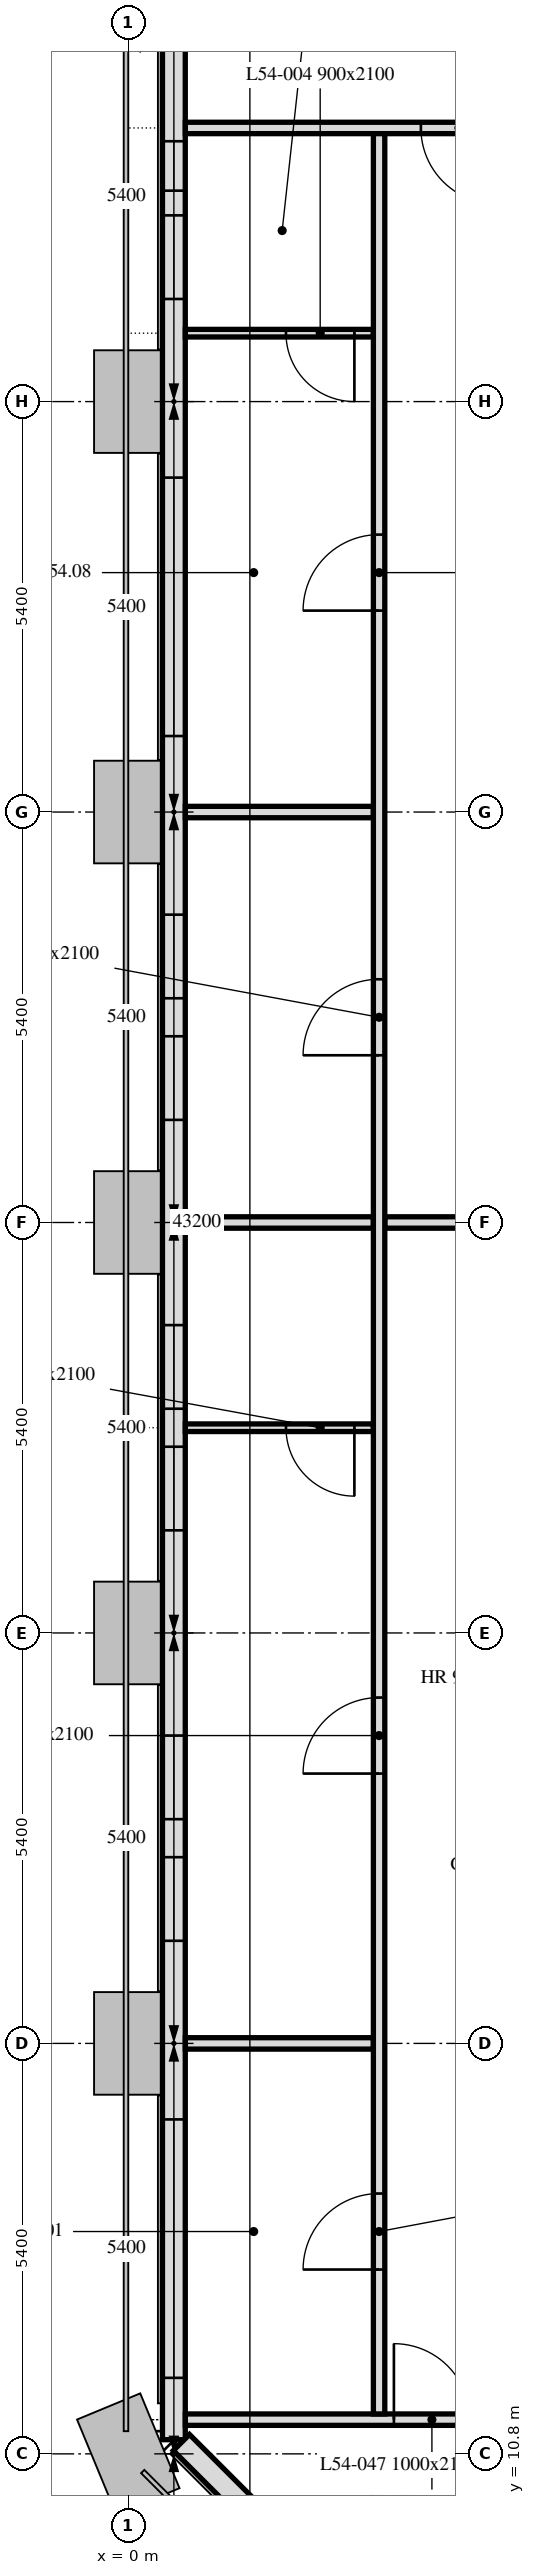
"""IFC4 building model, lengths in metres.
Left out: names, types, materials, properties, quantities, classifications, styles, units other than length and angle.
Written with IfcOpenShell. Run it as: python <this file> out.ifc"""

import sys

from ifc_helpers import new_model, si_unit, direction, frame, frame_2d, origin, place, context, subcontext, project, spatial, rectangle, extrude, element, fill, save


model = new_model("IFC4")
c1 = context("Model", 3, precision=1e-05, world=origin(), true_north=direction((0.0, 1.0)))
c2 = subcontext(c1, "Body", "Model", "MODEL_VIEW")
j1 = project(units=[si_unit("LENGTHUNIT", "METRE"), si_unit("PLANEANGLEUNIT", "RADIAN")], contexts=[c1])
p1 = place(None, origin())
s1 = spatial("IfcSite", under=j1, at=p1, CompositionType="ELEMENT")
p2 = place(p1, origin())
s2 = spatial("IfcBuilding", under=s1, at=p2, CompositionType="ELEMENT")
p3 = place(p2, frame((0.0, 0.0, 217.0)))
s3 = spatial("IfcBuildingStorey", under=s2, at=p3, CompositionType="ELEMENT", Elevation=217.0)
p4 = place(p3, frame((0.6, 43.014, 0.0), z_axis=(0.0, 0.0, 1.0), x_axis=(0.0, -1.0, 0.0)))
e1 = element("IfcWall", 1, at=p4, inside=s3, PredefinedType="SOLIDWALL", context=c2, shape_type="SweptSolid", body=[
    extrude(rectangle(XDim=32.027, YDim=0.3, at=frame_2d((16.014, 0.0))), origin(), (0.0, 0.0, 1.0), 3.0),
])
p5 = place(p4, frame((1.789, 0.0, 0.9)))
e2 = element("IfcOpeningElement", 2, at=p5, cuts=e1, PredefinedType="OPENING", context=c2, shape_type="SweptSolid", body=[
    extrude(rectangle(XDim=0.65, YDim=1.7, at=frame_2d((0.325, 0.85))), frame((0.0, 0.16, 0.0), z_axis=(0.0, -1.0, 0.0), x_axis=(1.0, 0.0, 0.0)), (0.0, 0.0, 1.0), 0.32),
])
p6 = place(p4, frame((2.764, 0.0, 0.9)))
e3 = element("IfcOpeningElement", 3, at=p6, cuts=e1, PredefinedType="OPENING", context=c2, shape_type="SweptSolid", body=[
    extrude(rectangle(XDim=1.1, YDim=1.7, at=frame_2d((0.55, 0.85))), frame((0.0, 0.16, 0.0), z_axis=(0.0, -1.0, 0.0), x_axis=(1.0, 0.0, 0.0)), (0.0, 0.0, 1.0), 0.32),
])
p7 = place(p4, frame((6.214, 0.0, 0.9)))
e4 = element("IfcOpeningElement", 4, at=p7, cuts=e1, PredefinedType="OPENING", context=c2, shape_type="SweptSolid", body=[
    extrude(rectangle(XDim=3.4, YDim=1.7, at=frame_2d((1.7, 0.85))), frame((0.0, 0.16, 0.0), z_axis=(0.0, -1.0, 0.0), x_axis=(1.0, 0.0, 0.0)), (0.0, 0.0, 1.0), 0.32),
])
p8 = place(p4, frame((11.964, 0.0, 0.9)))
e5 = element("IfcOpeningElement", 5, at=p8, cuts=e1, PredefinedType="OPENING", context=c2, shape_type="SweptSolid", body=[
    extrude(rectangle(XDim=1.1, YDim=1.7, at=frame_2d((0.55, 0.85))), frame((0.0, 0.16, 0.0), z_axis=(0.0, -1.0, 0.0), x_axis=(1.0, 0.0, 0.0)), (0.0, 0.0, 1.0), 0.32),
])
p9 = place(p4, frame((13.564, 0.0, 0.9)))
e6 = element("IfcOpeningElement", 6, at=p9, cuts=e1, PredefinedType="OPENING", context=c2, shape_type="SweptSolid", body=[
    extrude(rectangle(XDim=1.1, YDim=1.7, at=frame_2d((0.55, 0.85))), frame((0.0, 0.16, 0.0), z_axis=(0.0, -1.0, 0.0), x_axis=(1.0, 0.0, 0.0)), (0.0, 0.0, 1.0), 0.32),
])
p10 = place(p4, frame((17.364, 0.0, 0.9)))
e7 = element("IfcOpeningElement", 7, at=p10, cuts=e1, PredefinedType="OPENING", context=c2, shape_type="SweptSolid", body=[
    extrude(rectangle(XDim=1.1, YDim=1.7, at=frame_2d((0.55, 0.85))), frame((0.0, 0.16, 0.0), z_axis=(0.0, -1.0, 0.0), x_axis=(1.0, 0.0, 0.0)), (0.0, 0.0, 1.0), 0.32),
])
p11 = place(p4, frame((18.964, 0.0, 0.9)))
e8 = element("IfcOpeningElement", 8, at=p11, cuts=e1, PredefinedType="OPENING", context=c2, shape_type="SweptSolid", body=[
    extrude(rectangle(XDim=1.1, YDim=1.7, at=frame_2d((0.55, 0.85))), frame((0.0, 0.16, 0.0), z_axis=(0.0, -1.0, 0.0), x_axis=(1.0, 0.0, 0.0)), (0.0, 0.0, 1.0), 0.32),
])
p12 = place(p4, frame((22.764, 0.0, 0.9)))
e9 = element("IfcOpeningElement", 9, at=p12, cuts=e1, PredefinedType="OPENING", context=c2, shape_type="SweptSolid", body=[
    extrude(rectangle(XDim=1.1, YDim=1.7, at=frame_2d((0.55, 0.85))), frame((0.0, 0.16, 0.0), z_axis=(0.0, -1.0, 0.0), x_axis=(1.0, 0.0, 0.0)), (0.0, 0.0, 1.0), 0.32),
])
p13 = place(p4, frame((24.364, 0.0, 0.9)))
e10 = element("IfcOpeningElement", 10, at=p13, cuts=e1, PredefinedType="OPENING", context=c2, shape_type="SweptSolid", body=[
    extrude(rectangle(XDim=1.1, YDim=1.7, at=frame_2d((0.55, 0.85))), frame((0.0, 0.16, 0.0), z_axis=(0.0, -1.0, 0.0), x_axis=(1.0, 0.0, 0.0)), (0.0, 0.0, 1.0), 0.32),
])
p14 = place(p4, frame((27.814, 0.0, 0.9)))
e11 = element("IfcOpeningElement", 11, at=p14, cuts=e1, PredefinedType="OPENING", context=c2, shape_type="SweptSolid", body=[
    extrude(rectangle(XDim=3.4, YDim=1.7, at=frame_2d((1.7, 0.85))), frame((0.0, 0.16, 0.0), z_axis=(0.0, -1.0, 0.0), x_axis=(1.0, 0.0, 0.0)), (0.0, 0.0, 1.0), 0.32),
])
p15 = place(p3, frame((0.699, 10.949, 0.0), z_axis=(0.0, 0.0, 1.0), x_axis=(0.707106781187, -0.707106781187, 0.0)))
e12 = element("IfcWall", 12, at=p15, inside=s3, PredefinedType="SOLIDWALL", context=c2, shape_type="SweptSolid", body=[
    extrude(rectangle(XDim=6.86, YDim=0.3, at=frame_2d((3.43, 0.0))), origin(), (0.0, 0.0, 1.0), 3.0),
])
p16 = place(p15, frame((1.28, 0.0, 0.9)))
e13 = element("IfcOpeningElement", 13, at=p16, cuts=e12, PredefinedType="OPENING", context=c2, shape_type="SweptSolid", body=[
    extrude(rectangle(XDim=1.1, YDim=1.7, at=frame_2d((0.55, 0.85))), frame((0.0, 0.16, 0.0), z_axis=(0.0, -1.0, 0.0), x_axis=(1.0, 0.0, 0.0)), (0.0, 0.0, 1.0), 0.32),
])
p17 = place(p15, frame((4.48, 0.0, 0.9)))
e14 = element("IfcOpeningElement", 14, at=p17, cuts=e12, PredefinedType="OPENING", context=c2, shape_type="SweptSolid", body=[
    extrude(rectangle(XDim=1.1, YDim=1.7, at=frame_2d((0.55, 0.85))), frame((0.0, 0.16, 0.0), z_axis=(0.0, -1.0, 0.0), x_axis=(1.0, 0.0, 0.0)), (0.0, 0.0, 1.0), 0.32),
])
p18 = place(p3, frame((0.751, 32.4, 0.0), z_axis=(0.0, 0.0, 1.0), x_axis=(1.0, 0.0, 0.0)))
e15 = element("IfcWall", 15, at=p18, inside=s3, PredefinedType="PARTITIONING", context=c2, shape_type="SweptSolid", body=[
    extrude(rectangle(XDim=2.474, YDim=0.15, at=frame_2d((1.237, 0.0))), origin(), (0.0, 0.0, 1.0), 2.4),
])
p19 = place(p3, frame((3.225, 38.7, 0.0), z_axis=(0.0, 0.0, 1.0), x_axis=(-1.0, 0.0, 0.0)))
e16 = element("IfcWall", 16, at=p19, inside=s3, PredefinedType="PARTITIONING", context=c2, shape_type="SweptSolid", body=[
    extrude(rectangle(XDim=2.474, YDim=0.1, at=frame_2d((1.237, 0.0))), origin(), (0.0, 0.0, 1.0), 3.0),
])
p20 = place(p19, frame((0.25, 0.0, 0.0)))
e17 = element("IfcOpeningElement", 17, at=p20, cuts=e16, PredefinedType="OPENING", context=c2, shape_type="SweptSolid", body=[
    extrude(rectangle(XDim=0.9, YDim=2.1, at=frame_2d((0.45, 1.05))), frame((0.0, 0.05, 0.0), z_axis=(0.0, -1.0, 0.0), x_axis=(1.0, 0.0, 0.0)), (0.0, 0.0, 1.0), 0.1),
])
p21 = place(p3, frame((42.449, 41.4, 0.0), z_axis=(0.0, 0.0, 1.0), x_axis=(-1.0, 0.0, 0.0)))
e18 = element("IfcWall", 18, at=p21, inside=s3, PredefinedType="PARTITIONING", context=c2, shape_type="SweptSolid", body=[
    extrude(rectangle(XDim=41.698, YDim=0.15, at=frame_2d((20.849, 0.0))), origin(), (0.0, 0.0, 1.0), 2.4),
])
p22 = place(p21, frame((1.449, 0.0, 0.0)))
e19 = element("IfcOpeningElement", 19, at=p22, cuts=e18, PredefinedType="OPENING", context=c2, shape_type="SweptSolid", body=[
    extrude(rectangle(XDim=1.0, YDim=2.1, at=frame_2d((0.5, 1.05))), frame((0.0, 0.075, 0.0), z_axis=(0.0, -1.0, 0.0), x_axis=(1.0, 0.0, 0.0)), (0.0, 0.0, 1.0), 0.15),
])
p23 = place(p21, frame((29.249, 0.0, 0.0)))
e20 = element("IfcOpeningElement", 20, at=p23, cuts=e18, PredefinedType="OPENING", context=c2, shape_type="SweptSolid", body=[
    extrude(rectangle(XDim=1.0, YDim=2.1, at=frame_2d((0.5, 1.05))), frame((0.0, 0.075, 0.0), z_axis=(0.0, -1.0, 0.0), x_axis=(1.0, 0.0, 0.0)), (0.0, 0.0, 1.0), 0.15),
])
p24 = place(p21, frame((37.599, 0.0, 0.0)))
e21 = element("IfcOpeningElement", 21, at=p24, cuts=e18, PredefinedType="OPENING", context=c2, shape_type="SweptSolid", body=[
    extrude(rectangle(XDim=1.0, YDim=2.1, at=frame_2d((0.5, 1.05))), frame((0.0, 0.075, 0.0), z_axis=(0.0, -1.0, 0.0), x_axis=(1.0, 0.0, 0.0)), (0.0, 0.0, 1.0), 0.15),
])
p25 = place(p21, frame((17.649, 0.0, 0.0)))
e22 = element("IfcOpeningElement", 22, at=p25, cuts=e18, PredefinedType="OPENING", context=c2, shape_type="SweptSolid", body=[
    extrude(rectangle(XDim=1.0, YDim=2.1, at=frame_2d((0.5, 1.05))), frame((0.0, 0.075, 0.0), z_axis=(0.0, -1.0, 0.0), x_axis=(1.0, 0.0, 0.0)), (0.0, 0.0, 1.0), 0.15),
])
p26 = place(p3, frame((0.751, 27.0, 0.0), z_axis=(0.0, 0.0, 1.0), x_axis=(1.0, 0.0, 0.0)))
e23 = element("IfcWall", 23, at=p26, inside=s3, PredefinedType="PARTITIONING", context=c2, shape_type="SweptSolid", body=[
    extrude(rectangle(XDim=2.474, YDim=0.15, at=frame_2d((1.237, 0.0))), origin(), (0.0, 0.0, 1.0), 2.4),
])
p27 = place(p3, frame((3.375, 27.0, 0.0), z_axis=(0.0, 0.0, 1.0), x_axis=(1.0, 0.0, 0.0)))
e24 = element("IfcWall", 24, at=p27, inside=s3, PredefinedType="PARTITIONING", context=c2, shape_type="SweptSolid", body=[
    extrude(rectangle(XDim=2.025, YDim=0.15, at=frame_2d((1.012, 0.0))), origin(), (0.0, 0.0, 1.0), 2.4),
])
p28 = place(p3, frame((3.225, 16.2, 0.0), z_axis=(0.0, 0.0, 1.0), x_axis=(-1.0, 0.0, 0.0)))
e25 = element("IfcWall", 25, at=p28, inside=s3, PredefinedType="PARTITIONING", context=c2, shape_type="SweptSolid", body=[
    extrude(rectangle(XDim=2.474, YDim=0.15, at=frame_2d((1.237, 0.0))), origin(), (0.0, 0.0, 1.0), 2.4),
])
p29 = place(p3, frame((0.751, 11.25, 0.0), z_axis=(0.0, 0.0, 1.0), x_axis=(1.0, 0.0, 0.0)))
e26 = element("IfcWall", 26, at=p29, inside=s3, PredefinedType="PARTITIONING", context=c2, shape_type="SweptSolid", body=[
    extrude(rectangle(XDim=41.698, YDim=0.15, at=frame_2d((20.849, 0.0))), origin(), (0.0, 0.0, 1.0), 3.0),
])
p30 = place(p29, frame((39.249, 0.0, 0.0)))
e27 = element("IfcOpeningElement", 27, at=p30, cuts=e26, PredefinedType="OPENING", context=c2, shape_type="SweptSolid", body=[
    extrude(rectangle(XDim=1.0, YDim=2.1, at=frame_2d((0.5, 1.05))), frame((0.0, 0.075, 0.0), z_axis=(0.0, -1.0, 0.0), x_axis=(1.0, 0.0, 0.0)), (0.0, 0.0, 1.0), 0.15),
])
p31 = place(p29, frame((27.649, 0.0, 0.0)))
e28 = element("IfcOpeningElement", 28, at=p31, cuts=e26, PredefinedType="OPENING", context=c2, shape_type="SweptSolid", body=[
    extrude(rectangle(XDim=1.0, YDim=2.1, at=frame_2d((0.5, 1.05))), frame((0.0, 0.075, 0.0), z_axis=(0.0, -1.0, 0.0), x_axis=(1.0, 0.0, 0.0)), (0.0, 0.0, 1.0), 0.15),
])
p32 = place(p29, frame((23.049, 0.0, 0.0)))
e29 = element("IfcOpeningElement", 29, at=p32, cuts=e26, PredefinedType="OPENING", context=c2, shape_type="SweptSolid", body=[
    extrude(rectangle(XDim=1.0, YDim=2.1, at=frame_2d((0.5, 1.05))), frame((0.0, 0.075, 0.0), z_axis=(0.0, -1.0, 0.0), x_axis=(1.0, 0.0, 0.0)), (0.0, 0.0, 1.0), 0.15),
])
p33 = place(p29, frame((11.449, 0.0, 0.0)))
e30 = element("IfcOpeningElement", 30, at=p33, cuts=e26, PredefinedType="OPENING", context=c2, shape_type="SweptSolid", body=[
    extrude(rectangle(XDim=1.0, YDim=2.1, at=frame_2d((0.5, 1.05))), frame((0.0, 0.075, 0.0), z_axis=(0.0, -1.0, 0.0), x_axis=(1.0, 0.0, 0.0)), (0.0, 0.0, 1.0), 0.15),
])
p34 = place(p29, frame((2.744, 0.0, 0.0)))
e31 = element("IfcOpeningElement", 31, at=p34, cuts=e26, PredefinedType="OPENING", context=c2, shape_type="SweptSolid", body=[
    extrude(rectangle(XDim=1.0, YDim=2.1, at=frame_2d((0.5, 1.05))), frame((0.0, 0.075, 0.0), z_axis=(0.0, -1.0, 0.0), x_axis=(1.0, 0.0, 0.0)), (0.0, 0.0, 1.0), 0.15),
])
p35 = place(p3, frame((3.225, 24.3, 0.0), z_axis=(0.0, 0.0, 1.0), x_axis=(-1.0, 0.0, 0.0)))
e32 = element("IfcWall", 32, at=p35, inside=s3, PredefinedType="PARTITIONING", context=c2, shape_type="SweptSolid", body=[
    extrude(rectangle(XDim=2.474, YDim=0.1, at=frame_2d((1.237, 0.0))), origin(), (0.0, 0.0, 1.0), 3.0),
])
p36 = place(p35, frame((0.25, 0.0, 0.0)))
e33 = element("IfcOpeningElement", 33, at=p36, cuts=e32, PredefinedType="OPENING", context=c2, shape_type="SweptSolid", body=[
    extrude(rectangle(XDim=0.9, YDim=2.1, at=frame_2d((0.45, 1.05))), frame((0.0, 0.05, 0.0), z_axis=(0.0, -1.0, 0.0), x_axis=(1.0, 0.0, 0.0)), (0.0, 0.0, 1.0), 0.1),
])
p37 = place(p3, frame((3.3, 11.325, 0.0), z_axis=(0.0, 0.0, 1.0), x_axis=(0.0, 1.0, 0.0)))
e34 = element("IfcWall", 34, at=p37, inside=s3, PredefinedType="PARTITIONING", context=c2, shape_type="SweptSolid", body=[
    extrude(rectangle(XDim=30.0, YDim=0.15, at=frame_2d((15.0, 0.0))), origin(), (0.0, 0.0, 1.0), 2.4),
])
p38 = place(p37, frame((17.875, 0.0, 0.0)))
e35 = element("IfcOpeningElement", 35, at=p38, cuts=e34, PredefinedType="OPENING", context=c2, shape_type="SweptSolid", body=[
    extrude(rectangle(XDim=1.0, YDim=2.1, at=frame_2d((0.5, 1.05))), frame((0.0, 0.075, 0.0), z_axis=(0.0, -1.0, 0.0), x_axis=(1.0, 0.0, 0.0)), (0.0, 0.0, 1.0), 0.15),
])
p39 = place(p37, frame((1.9, 0.0, 0.0)))
e36 = element("IfcOpeningElement", 36, at=p39, cuts=e34, PredefinedType="OPENING", context=c2, shape_type="SweptSolid", body=[
    extrude(rectangle(XDim=1.0, YDim=2.1, at=frame_2d((0.5, 1.05))), frame((0.0, 0.075, 0.0), z_axis=(0.0, -1.0, 0.0), x_axis=(1.0, 0.0, 0.0)), (0.0, 0.0, 1.0), 0.15),
])
p40 = place(p37, frame((23.725, 0.0, 0.0)))
e37 = element("IfcOpeningElement", 37, at=p40, cuts=e34, PredefinedType="OPENING", context=c2, shape_type="SweptSolid", body=[
    extrude(rectangle(XDim=1.0, YDim=2.1, at=frame_2d((0.5, 1.05))), frame((0.0, 0.075, 0.0), z_axis=(0.0, -1.0, 0.0), x_axis=(1.0, 0.0, 0.0)), (0.0, 0.0, 1.0), 0.15),
])
p41 = place(p37, frame((8.425, 0.0, 0.0)))
e38 = element("IfcOpeningElement", 38, at=p41, cuts=e34, PredefinedType="OPENING", context=c2, shape_type="SweptSolid", body=[
    extrude(rectangle(XDim=1.0, YDim=2.1, at=frame_2d((0.5, 1.05))), frame((0.0, 0.075, 0.0), z_axis=(0.0, -1.0, 0.0), x_axis=(1.0, 0.0, 0.0)), (0.0, 0.0, 1.0), 0.15),
])
p42 = place(p5, origin())
e39 = element("IfcWindow", 39, at=p42, inside=s3, PartitioningType="SINGLE_PANEL", PredefinedType="WINDOW", context=c2, shape_type="SweptSolid", body=[
    extrude(rectangle(XDim=0.65, YDim=1.7, at=frame_2d((0.325, 0.85))), frame((0.0, 0.03, 0.0), z_axis=(0.0, -1.0, 0.0), x_axis=(1.0, 0.0, 0.0)), (0.0, 0.0, 1.0), 0.06),
])
fill(e2, e39)
p43 = place(p6, origin())
e40 = element("IfcWindow", 40, at=p43, inside=s3, PartitioningType="SINGLE_PANEL", PredefinedType="WINDOW", context=c2, shape_type="SweptSolid", body=[
    extrude(rectangle(XDim=1.1, YDim=1.7, at=frame_2d((0.55, 0.85))), frame((0.0, 0.03, 0.0), z_axis=(0.0, -1.0, 0.0), x_axis=(1.0, 0.0, 0.0)), (0.0, 0.0, 1.0), 0.06),
])
fill(e3, e40)
p44 = place(p7, origin())
e41 = element("IfcWindow", 41, at=p44, inside=s3, PartitioningType="SINGLE_PANEL", PredefinedType="WINDOW", context=c2, shape_type="SweptSolid", body=[
    extrude(rectangle(XDim=3.4, YDim=1.7, at=frame_2d((1.7, 0.85))), frame((0.0, 0.03, 0.0), z_axis=(0.0, -1.0, 0.0), x_axis=(1.0, 0.0, 0.0)), (0.0, 0.0, 1.0), 0.06),
])
fill(e4, e41)
p45 = place(p8, origin())
e42 = element("IfcWindow", 42, at=p45, inside=s3, PartitioningType="SINGLE_PANEL", PredefinedType="WINDOW", context=c2, shape_type="SweptSolid", body=[
    extrude(rectangle(XDim=1.1, YDim=1.7, at=frame_2d((0.55, 0.85))), frame((0.0, 0.03, 0.0), z_axis=(0.0, -1.0, 0.0), x_axis=(1.0, 0.0, 0.0)), (0.0, 0.0, 1.0), 0.06),
])
fill(e5, e42)
p46 = place(p9, origin())
e43 = element("IfcWindow", 43, at=p46, inside=s3, PartitioningType="SINGLE_PANEL", PredefinedType="WINDOW", context=c2, shape_type="SweptSolid", body=[
    extrude(rectangle(XDim=1.1, YDim=1.7, at=frame_2d((0.55, 0.85))), frame((0.0, 0.03, 0.0), z_axis=(0.0, -1.0, 0.0), x_axis=(1.0, 0.0, 0.0)), (0.0, 0.0, 1.0), 0.06),
])
fill(e6, e43)
p47 = place(p10, origin())
e44 = element("IfcWindow", 44, at=p47, inside=s3, PartitioningType="SINGLE_PANEL", PredefinedType="WINDOW", context=c2, shape_type="SweptSolid", body=[
    extrude(rectangle(XDim=1.1, YDim=1.7, at=frame_2d((0.55, 0.85))), frame((0.0, 0.03, 0.0), z_axis=(0.0, -1.0, 0.0), x_axis=(1.0, 0.0, 0.0)), (0.0, 0.0, 1.0), 0.06),
])
fill(e7, e44)
p48 = place(p11, origin())
e45 = element("IfcWindow", 45, at=p48, inside=s3, PartitioningType="SINGLE_PANEL", PredefinedType="WINDOW", context=c2, shape_type="SweptSolid", body=[
    extrude(rectangle(XDim=1.1, YDim=1.7, at=frame_2d((0.55, 0.85))), frame((0.0, 0.03, 0.0), z_axis=(0.0, -1.0, 0.0), x_axis=(1.0, 0.0, 0.0)), (0.0, 0.0, 1.0), 0.06),
])
fill(e8, e45)
p49 = place(p12, origin())
e46 = element("IfcWindow", 46, at=p49, inside=s3, PartitioningType="SINGLE_PANEL", PredefinedType="WINDOW", context=c2, shape_type="SweptSolid", body=[
    extrude(rectangle(XDim=1.1, YDim=1.7, at=frame_2d((0.55, 0.85))), frame((0.0, 0.03, 0.0), z_axis=(0.0, -1.0, 0.0), x_axis=(1.0, 0.0, 0.0)), (0.0, 0.0, 1.0), 0.06),
])
fill(e9, e46)
p50 = place(p13, origin())
e47 = element("IfcWindow", 47, at=p50, inside=s3, PartitioningType="SINGLE_PANEL", PredefinedType="WINDOW", context=c2, shape_type="SweptSolid", body=[
    extrude(rectangle(XDim=1.1, YDim=1.7, at=frame_2d((0.55, 0.85))), frame((0.0, 0.03, 0.0), z_axis=(0.0, -1.0, 0.0), x_axis=(1.0, 0.0, 0.0)), (0.0, 0.0, 1.0), 0.06),
])
fill(e10, e47)
p51 = place(p14, origin())
e48 = element("IfcWindow", 48, at=p51, inside=s3, PartitioningType="SINGLE_PANEL", PredefinedType="WINDOW", context=c2, shape_type="SweptSolid", body=[
    extrude(rectangle(XDim=3.4, YDim=1.7, at=frame_2d((1.7, 0.85))), frame((0.0, 0.03, 0.0), z_axis=(0.0, -1.0, 0.0), x_axis=(1.0, 0.0, 0.0)), (0.0, 0.0, 1.0), 0.06),
])
fill(e11, e48)
p52 = place(p20, origin())
e49 = element("IfcDoor", 49, at=p52, inside=s3, OperationType="SINGLE_SWING_RIGHT", PredefinedType="DOOR", context=c2, shape_type="SweptSolid", body=[
    extrude(rectangle(XDim=0.9, YDim=2.1, at=frame_2d((0.45, 1.05))), frame((0.0, 0.025, 0.0), z_axis=(0.0, -1.0, 0.0), x_axis=(1.0, 0.0, 0.0)), (0.0, 0.0, 1.0), 0.05),
])
fill(e17, e49)
p53 = place(p38, origin())
e50 = element("IfcDoor", 50, at=p53, inside=s3, OperationType="SINGLE_SWING_RIGHT", PredefinedType="DOOR", context=c2, shape_type="SweptSolid", body=[
    extrude(rectangle(XDim=1.0, YDim=2.1, at=frame_2d((0.5, 1.05))), frame((0.0, 0.025, 0.0), z_axis=(0.0, -1.0, 0.0), x_axis=(1.0, 0.0, 0.0)), (0.0, 0.0, 1.0), 0.05),
])
fill(e35, e50)
p54 = place(p39, origin())
e51 = element("IfcDoor", 51, at=p54, inside=s3, OperationType="SINGLE_SWING_LEFT", PredefinedType="DOOR", context=c2, shape_type="SweptSolid", body=[
    extrude(rectangle(XDim=1.0, YDim=2.1, at=frame_2d((0.5, 1.05))), frame((0.0, 0.025, 0.0), z_axis=(0.0, -1.0, 0.0), x_axis=(1.0, 0.0, 0.0)), (0.0, 0.0, 1.0), 0.05),
])
fill(e36, e51)
p55 = place(p36, origin())
e52 = element("IfcDoor", 52, at=p55, inside=s3, OperationType="SINGLE_SWING_LEFT", PredefinedType="DOOR", context=c2, shape_type="SweptSolid", body=[
    extrude(rectangle(XDim=0.9, YDim=2.1, at=frame_2d((0.45, 1.05))), frame((0.0, 0.025, 0.0), z_axis=(0.0, -1.0, 0.0), x_axis=(1.0, 0.0, 0.0)), (0.0, 0.0, 1.0), 0.05),
])
fill(e33, e52)
p56 = place(p40, origin())
e53 = element("IfcDoor", 53, at=p56, inside=s3, OperationType="SINGLE_SWING_LEFT", PredefinedType="DOOR", context=c2, shape_type="SweptSolid", body=[
    extrude(rectangle(XDim=1.0, YDim=2.1, at=frame_2d((0.5, 1.05))), frame((0.0, 0.025, 0.0), z_axis=(0.0, -1.0, 0.0), x_axis=(1.0, 0.0, 0.0)), (0.0, 0.0, 1.0), 0.05),
])
fill(e37, e53)
p57 = place(p24, origin())
e54 = element("IfcDoor", 54, at=p57, inside=s3, OperationType="SINGLE_SWING_LEFT", PredefinedType="DOOR", context=c2, shape_type="SweptSolid", body=[
    extrude(rectangle(XDim=1.0, YDim=2.1, at=frame_2d((0.5, 1.05))), frame((0.0, 0.025, 0.0), z_axis=(0.0, -1.0, 0.0), x_axis=(1.0, 0.0, 0.0)), (0.0, 0.0, 1.0), 0.05),
])
fill(e21, e54)
p58 = place(p34, origin())
e55 = element("IfcDoor", 55, at=p58, inside=s3, OperationType="SINGLE_SWING_LEFT", PredefinedType="DOOR", context=c2, shape_type="SweptSolid", body=[
    extrude(rectangle(XDim=1.0, YDim=2.1, at=frame_2d((0.5, 1.05))), frame((0.0, 0.025, 0.0), z_axis=(0.0, -1.0, 0.0), x_axis=(1.0, 0.0, 0.0)), (0.0, 0.0, 1.0), 0.05),
])
fill(e31, e55)
p59 = place(p41, origin())
e56 = element("IfcDoor", 56, at=p59, inside=s3, OperationType="SINGLE_SWING_LEFT", PredefinedType="DOOR", context=c2, shape_type="SweptSolid", body=[
    extrude(rectangle(XDim=1.0, YDim=2.1, at=frame_2d((0.5, 1.05))), frame((0.0, 0.025, 0.0), z_axis=(0.0, -1.0, 0.0), x_axis=(1.0, 0.0, 0.0)), (0.0, 0.0, 1.0), 0.05),
])
fill(e38, e56)
save(model, sys.argv[1])
